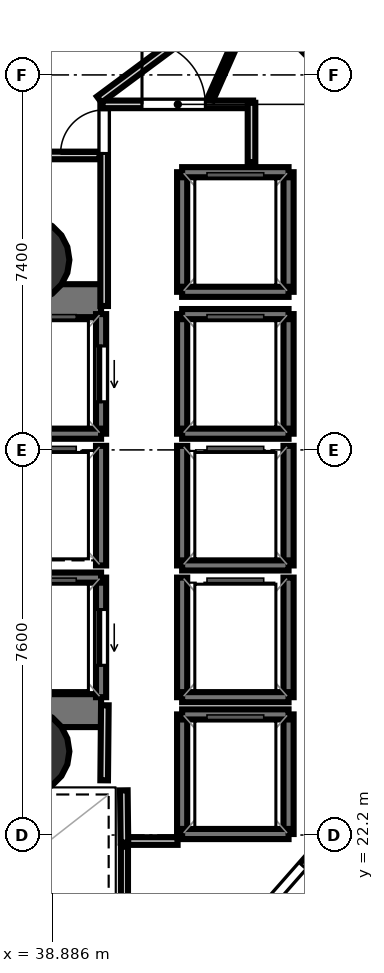
"""IFC4 building model, lengths in metres.
Left out: names, types, materials, properties, quantities, classifications, styles, units other than length and angle.
Written with IfcOpenShell. Run it as: python <this file> out.ifc"""

import sys

from ifc_helpers import new_model, si_unit, direction, frame, frame_2d, origin, origin_2d, place, context, subcontext, project, spatial, rectangle, hollow_circle, extrude, element, fill, save


model = new_model("IFC4")
c1 = context("Model", 3, precision=1e-05, world=origin(), true_north=direction((0.0, 1.0)))
c2 = subcontext(c1, "Body", "Model", "MODEL_VIEW")
j1 = project(units=[si_unit("LENGTHUNIT", "METRE"), si_unit("PLANEANGLEUNIT", "RADIAN")], contexts=[c1])
p1 = place(None, origin())
s1 = spatial("IfcSite", under=j1, at=p1, CompositionType="ELEMENT")
p2 = place(p1, origin())
s2 = spatial("IfcBuilding", under=s1, at=p2, CompositionType="ELEMENT")
p3 = place(p2, frame((0.0, 0.0, 56.2)))
s3 = spatial("IfcBuildingStorey", under=s2, at=p3, CompositionType="ELEMENT", Elevation=56.2)
p4 = place(p3, frame((29.13, 32.745, 0.0), z_axis=(0.0, 0.0, 1.0), x_axis=(1.0, 0.0, 0.0)))
e1 = element("IfcWall", 1, at=p4, inside=s3, PredefinedType="SHEAR", context=c2, shape_type="SweptSolid", body=[
    extrude(rectangle(XDim=10.72, YDim=0.65, at=frame_2d((5.36, 0.0))), origin(), (0.0, 0.0, 1.0), 3.52),
])
p5 = place(p4, frame((1.095, 0.0, 0.0)))
e2 = element("IfcOpeningElement", 2, at=p5, cuts=e1, PredefinedType="OPENING", context=c2, shape_type="SweptSolid", body=[
    extrude(rectangle(XDim=1.25, YDim=2.15, at=frame_2d((0.625, 1.075))), frame((0.0, 0.335, 0.0), z_axis=(0.0, -1.0, 0.0), x_axis=(1.0, 0.0, 0.0)), (0.0, 0.0, 1.0), 0.67),
])
p6 = place(p3, frame((29.13, 24.655, 0.0), z_axis=(0.0, 0.0, 1.0), x_axis=(1.0, 0.0, 0.0)))
e3 = element("IfcWall", 3, at=p6, inside=s3, PredefinedType="SHEAR", context=c2, shape_type="SweptSolid", body=[
    extrude(rectangle(XDim=10.72, YDim=0.65, at=frame_2d((5.36, 0.0))), origin(), (0.0, 0.0, 1.0), 3.52),
])
p7 = place(p6, frame((0.895, 0.0, 0.0)))
e4 = element("IfcOpeningElement", 4, at=p7, cuts=e3, PredefinedType="OPENING", context=c2, shape_type="SweptSolid", body=[
    extrude(rectangle(XDim=1.25, YDim=2.15, at=frame_2d((0.625, 1.075))), frame((0.0, 0.335, 0.0), z_axis=(0.0, -1.0, 0.0), x_axis=(1.0, 0.0, 0.0)), (0.0, 0.0, 1.0), 0.67),
])
for number, where, z_axis, x_axis in (
    (5, (38.4, 33.55, 0.0), (0.0, 0.0, 1.0), (1.0, 0.0, 0.0)),
    (6, (38.4, 23.85, 0.0), (0.0, 0.0, 1.0), (1.0, 0.0, 0.0)),
):
    element("IfcColumn", number, at=place(p3, frame(where, z_axis=z_axis, x_axis=x_axis)), inside=s3, PredefinedType="COLUMN", context=c2, shape_type="SweptSolid", body=[
        extrude(hollow_circle(Radius=0.825, WallThickness=0.04, at=origin_2d()), origin(), (0.0, 0.0, 1.0), 3.7),
    ])
p8 = place(p3, frame((39.85, 30.12, 0.0), z_axis=(0.0, 0.0, 1.0), x_axis=(0.0, 1.0, 0.0)))
e7 = element("IfcWall", 7, at=p8, inside=s3, PredefinedType="SOLIDWALL", context=c2, shape_type="SweptSolid", body=[
    extrude(rectangle(XDim=2.36, YDim=0.2, at=frame_2d((1.18, 0.0))), origin(), (0.0, 0.0, 1.0), 3.52),
])
p9 = place(p8, frame((0.63, 0.0, 0.0)))
e8 = element("IfcOpeningElement", 8, at=p9, cuts=e7, PredefinedType="OPENING", context=c2, shape_type="SweptSolid", body=[
    extrude(rectangle(XDim=1.1, YDim=2.15, at=frame_2d((0.55, 1.075))), frame((0.0, 0.11, 0.0), z_axis=(0.0, -1.0, 0.0), x_axis=(1.0, 0.0, 0.0)), (0.0, 0.0, 1.0), 0.22),
])
p10 = place(p3, frame((37.75, 30.12, 0.0), z_axis=(0.0, 0.0, 1.0), x_axis=(1.0, 0.0, 0.0)))
e9 = element("IfcWall", 9, at=p10, inside=s3, PredefinedType="SOLIDWALL", context=c2, shape_type="SweptSolid", body=[
    extrude(rectangle(XDim=2.1, YDim=0.2, at=frame_2d((1.05, 0.0))), origin(), (0.0, 0.0, 1.0), 3.52),
])
p11 = place(p3, frame((39.85, 24.92, 0.0), z_axis=(0.0, 0.0, 1.0), x_axis=(0.0, 1.0, 0.0)))
e10 = element("IfcWall", 10, at=p11, inside=s3, PredefinedType="SOLIDWALL", context=c2, shape_type="SweptSolid", body=[
    extrude(rectangle(XDim=2.36, YDim=0.2, at=frame_2d((1.18, 0.0))), origin(), (0.0, 0.0, 1.0), 3.52),
])
p12 = place(p11, frame((0.63, 0.0, 0.0)))
e11 = element("IfcOpeningElement", 11, at=p12, cuts=e10, PredefinedType="OPENING", context=c2, shape_type="SweptSolid", body=[
    extrude(rectangle(XDim=1.1, YDim=2.15, at=frame_2d((0.55, 1.075))), frame((0.0, 0.11, 0.0), z_axis=(0.0, -1.0, 0.0), x_axis=(1.0, 0.0, 0.0)), (0.0, 0.0, 1.0), 0.22),
])
p13 = place(p3, frame((37.75, 27.28, 0.0), z_axis=(0.0, 0.0, 1.0), x_axis=(1.0, 0.0, 0.0)))
e12 = element("IfcWall", 12, at=p13, inside=s3, PredefinedType="SOLIDWALL", context=c2, shape_type="SweptSolid", body=[
    extrude(rectangle(XDim=2.1, YDim=0.2, at=frame_2d((1.05, 0.0))), origin(), (0.0, 0.0, 1.0), 3.52),
])
for number, where, z_axis, x_axis in (
    (13, (43.55, 30.12, 0.0), (0.0, 0.0, 1.0), (0.0, 1.0, 0.0)),
    (14, (41.45, 30.12, 0.0), (0.0, 0.0, 1.0), (0.0, 1.0, 0.0)),
):
    element("IfcWall", number, at=place(p3, frame(where, z_axis=z_axis, x_axis=x_axis)), inside=s3, PredefinedType="SOLIDWALL", context=c2, shape_type="SweptSolid", body=[
        extrude(rectangle(XDim=2.36, YDim=0.2, at=frame_2d((1.18, 0.0))), origin(), (0.0, 0.0, 1.0), 3.52),
    ])
for number, where, z_axis, x_axis in (
    (15, (41.45, 32.48, 0.0), (0.0, 0.0, 1.0), (1.0, 0.0, 0.0)),
    (16, (41.45, 30.12, 0.0), (0.0, 0.0, 1.0), (1.0, 0.0, 0.0)),
):
    element("IfcWall", number, at=place(p3, frame(where, z_axis=z_axis, x_axis=x_axis)), inside=s3, PredefinedType="SOLIDWALL", context=c2, shape_type="SweptSolid", body=[
        extrude(rectangle(XDim=2.1, YDim=0.2, at=frame_2d((1.05, 0.0))), origin(), (0.0, 0.0, 1.0), 3.52),
    ])
for number, where, z_axis, x_axis in (
    (17, (43.55, 27.52, 0.0), (0.0, 0.0, 1.0), (0.0, 1.0, 0.0)),
    (18, (41.45, 27.52, 0.0), (0.0, 0.0, 1.0), (0.0, 1.0, 0.0)),
):
    element("IfcWall", number, at=place(p3, frame(where, z_axis=z_axis, x_axis=x_axis)), inside=s3, PredefinedType="SOLIDWALL", context=c2, shape_type="SweptSolid", body=[
        extrude(rectangle(XDim=2.36, YDim=0.2, at=frame_2d((1.18, 0.0))), origin(), (0.0, 0.0, 1.0), 3.52),
    ])
p14 = place(p3, frame((41.45, 27.52, 0.0), z_axis=(0.0, 0.0, 1.0), x_axis=(1.0, 0.0, 0.0)))
e19 = element("IfcWall", 19, at=p14, inside=s3, PredefinedType="SOLIDWALL", context=c2, shape_type="SweptSolid", body=[
    extrude(rectangle(XDim=2.1, YDim=0.2, at=frame_2d((1.05, 0.0))), origin(), (0.0, 0.0, 1.0), 3.52),
])
for number, where, z_axis, x_axis in (
    (20, (43.55, 24.92, 0.0), (0.0, 0.0, 1.0), (0.0, 1.0, 0.0)),
    (21, (41.45, 24.92, 0.0), (0.0, 0.0, 1.0), (0.0, 1.0, 0.0)),
):
    element("IfcWall", number, at=place(p3, frame(where, z_axis=z_axis, x_axis=x_axis)), inside=s3, PredefinedType="SOLIDWALL", context=c2, shape_type="SweptSolid", body=[
        extrude(rectangle(XDim=2.36, YDim=0.2, at=frame_2d((1.18, 0.0))), origin(), (0.0, 0.0, 1.0), 3.52),
    ])
p15 = place(p3, frame((41.45, 24.92, 0.0), z_axis=(0.0, 0.0, 1.0), x_axis=(1.0, 0.0, 0.0)))
e22 = element("IfcWall", 22, at=p15, inside=s3, PredefinedType="SOLIDWALL", context=c2, shape_type="SweptSolid", body=[
    extrude(rectangle(XDim=2.1, YDim=0.2, at=frame_2d((1.05, 0.0))), origin(), (0.0, 0.0, 1.0), 3.52),
])
p16 = place(p3, frame((39.85, 27.52, 0.0), z_axis=(0.0, 0.0, 1.0), x_axis=(0.0, 1.0, 0.0)))
e23 = element("IfcWall", 23, at=p16, inside=s3, PredefinedType="SOLIDWALL", context=c2, shape_type="SweptSolid", body=[
    extrude(rectangle(XDim=2.36, YDim=0.2, at=frame_2d((1.18, 0.0))), origin(), (0.0, 0.0, 1.0), 3.52),
])
for number, where, z_axis, x_axis in (
    (24, (43.55, 22.22, 0.0), (0.0, 0.0, 1.0), (0.0, 1.0, 0.0)),
    (25, (41.45, 22.22, 0.0), (0.0, 0.0, 1.0), (0.0, 1.0, 0.0)),
):
    element("IfcWall", number, at=place(p3, frame(where, z_axis=z_axis, x_axis=x_axis)), inside=s3, PredefinedType="SOLIDWALL", context=c2, shape_type="SweptSolid", body=[
        extrude(rectangle(XDim=2.36, YDim=0.2, at=frame_2d((1.18, 0.0))), origin(), (0.0, 0.0, 1.0), 3.52),
    ])
for number, where, z_axis, x_axis in (
    (26, (41.45, 24.58, 0.0), (0.0, 0.0, 1.0), (1.0, 0.0, 0.0)),
    (27, (41.45, 22.22, 0.0), (0.0, 0.0, 1.0), (1.0, 0.0, 0.0)),
):
    element("IfcWall", number, at=place(p3, frame(where, z_axis=z_axis, x_axis=x_axis)), inside=s3, PredefinedType="SOLIDWALL", context=c2, shape_type="SweptSolid", body=[
        extrude(rectangle(XDim=2.1, YDim=0.2, at=frame_2d((1.05, 0.0))), origin(), (0.0, 0.0, 1.0), 3.52),
    ])
for number, where, z_axis, x_axis in (
    (28, (43.55, 32.92, 0.0), (0.0, 0.0, 1.0), (0.0, 1.0, 0.0)),
    (29, (41.45, 32.92, 0.0), (0.0, 0.0, 1.0), (0.0, 1.0, 0.0)),
):
    element("IfcWall", number, at=place(p3, frame(where, z_axis=z_axis, x_axis=x_axis)), inside=s3, PredefinedType="SOLIDWALL", context=c2, shape_type="SweptSolid", body=[
        extrude(rectangle(XDim=2.36, YDim=0.2, at=frame_2d((1.18, 0.0))), origin(), (0.0, 0.0, 1.0), 3.52),
    ])
for number, where, z_axis, x_axis in (
    (30, (41.45, 35.28, 0.0), (0.0, 0.0, 1.0), (1.0, 0.0, 0.0)),
    (31, (41.45, 32.92, 0.0), (0.0, 0.0, 1.0), (1.0, 0.0, 0.0)),
):
    element("IfcWall", number, at=place(p3, frame(where, z_axis=z_axis, x_axis=x_axis)), inside=s3, PredefinedType="SOLIDWALL", context=c2, shape_type="SweptSolid", body=[
        extrude(rectangle(XDim=2.1, YDim=0.2, at=frame_2d((1.05, 0.0))), origin(), (0.0, 0.0, 1.0), 3.52),
    ])
p17 = place(p3, frame((39.911, 32.64, 0.0), z_axis=(0.0, 0.0, 1.0), x_axis=(0.0, 1.0, 0.0)))
e32 = element("IfcWall", 32, at=p17, inside=s3, PredefinedType="PARTITIONING", context=c2, shape_type="SweptSolid", body=[
    extrude(rectangle(XDim=4.01, YDim=0.15, at=frame_2d((2.005, 0.0))), origin(), (0.0, 0.0, 1.0), 2.84),
])
p18 = place(p17, frame((3.01, 0.0, 0.0)))
e33 = element("IfcOpeningElement", 33, at=p18, cuts=e32, PredefinedType="OPENING", context=c2, shape_type="SweptSolid", body=[
    extrude(rectangle(XDim=0.86, YDim=2.05, at=frame_2d((0.43, 1.025))), frame((0.0, 0.085, 0.0), z_axis=(0.0, -1.0, 0.0), x_axis=(1.0, 0.0, 0.0)), (0.0, 0.0, 1.0), 0.17),
])
p19 = place(p3, frame((39.88, 36.619, 0.0), z_axis=(0.0, 0.0, 1.0), x_axis=(1.0, 0.0, 0.0)))
e34 = element("IfcWall", 34, at=p19, inside=s3, PredefinedType="PARTITIONING", context=c2, shape_type="SweptSolid", body=[
    extrude(rectangle(XDim=2.97, YDim=0.15, at=frame_2d((1.485, 0.0))), origin(), (0.0, 0.0, 1.0), 2.798),
])
p20 = place(p19, frame((0.778, 0.0, 0.0)))
e35 = element("IfcOpeningElement", 35, at=p20, cuts=e34, PredefinedType="OPENING", context=c2, shape_type="SweptSolid", body=[
    extrude(rectangle(XDim=1.25, YDim=2.2, at=frame_2d((0.625, 1.1))), frame((0.0, 0.085, 0.0), z_axis=(0.0, -1.0, 0.0), x_axis=(1.0, 0.0, 0.0)), (0.0, 0.0, 1.0), 0.17),
])
p21 = place(p3, frame((42.819, 36.65, 0.0), z_axis=(0.0, 0.0, 1.0), x_axis=(0.0, -1.0, 0.0)))
e36 = element("IfcWall", 36, at=p21, inside=s3, PredefinedType="PARTITIONING", context=c2, shape_type="SweptSolid", body=[
    extrude(rectangle(XDim=1.17, YDim=0.15, at=frame_2d((0.585, 0.0))), origin(), (0.0, 0.0, 1.0), 2.798),
])
p22 = place(p3, frame((41.36, 22.081, 0.0), z_axis=(0.0, 0.0, 1.0), x_axis=(-1.0, 0.0, 0.0)))
e37 = element("IfcWall", 37, at=p22, inside=s3, PredefinedType="PARTITIONING", context=c2, shape_type="SweptSolid", body=[
    extrude(rectangle(XDim=1.08, YDim=0.15, at=frame_2d((0.54, 0.0))), origin(), (0.0, 0.0, 1.0), 2.84),
])
p23 = place(p3, frame((40.311, 22.05, 0.0), z_axis=(0.0, 0.0, 1.0), x_axis=(-0.011836292006, 0.999929948642, 0.0)))
e38 = element("IfcWall", 38, at=p23, inside=s3, PredefinedType="PARTITIONING", context=c2, shape_type="SweptSolid", body=[
    extrude(rectangle(XDim=1.031, YDim=0.15, at=frame_2d((0.516, 0.0))), origin(), (0.0, 0.0, 1.0), 2.84),
])
p24 = place(p3, frame((39.911, 23.28, 0.0), z_axis=(0.0, 0.0, 1.0), x_axis=(0.009397771291, 0.999955839972, 0.0)))
e39 = element("IfcWall", 39, at=p24, inside=s3, PredefinedType="PARTITIONING", context=c2, shape_type="SweptSolid", body=[
    extrude(rectangle(XDim=1.481, YDim=0.15, at=frame_2d((0.74, 0.0))), origin(), (0.0, 0.0, 1.0), 2.84),
])
p25 = place(p3, frame((42.185, 38.475, 0.0), z_axis=(0.0, 0.0, 1.0), x_axis=(-0.802818467394, -0.596223538961, 0.0)))
e40 = element("IfcWall", 40, at=p25, inside=s3, PredefinedType="PARTITIONING", context=c2, shape_type="SweptSolid", body=[
    extrude(rectangle(XDim=2.953, YDim=0.15, at=frame_2d((1.477, 0.0))), origin(), (0.0, 0.0, 1.0), 2.798),
])
p26 = place(p3, frame((39.818, 35.611, 0.0), z_axis=(0.0, 0.0, 1.0), x_axis=(-1.0, 0.0, 0.0)))
e41 = element("IfcWall", 41, at=p26, inside=s3, PredefinedType="PARTITIONING", context=c2, shape_type="SweptSolid", body=[
    extrude(rectangle(XDim=2.768, YDim=0.15, at=frame_2d((1.384, 0.0))), origin(), (0.0, 0.0, 1.0), 2.84),
])
p27 = place(p3, frame((40.311, 18.0, 0.0), z_axis=(0.0, 0.0, 1.0), x_axis=(0.0, 1.0, 0.0)))
e42 = element("IfcWall", 42, at=p27, inside=s3, PredefinedType="PARTITIONING", context=c2, shape_type="SweptSolid", body=[
    extrude(rectangle(XDim=3.97, YDim=0.14, at=frame_2d((1.985, 0.0))), origin(), (0.0, 0.0, 1.0), 2.84),
])
p28 = place(p3, frame((42.005, 36.717, 0.0), z_axis=(0.0, 0.0, 1.0), x_axis=(0.405063455742, 0.914288574151, 0.0)))
e43 = element("IfcWall", 43, at=p28, inside=s3, PredefinedType="PARTITIONING", context=c2, shape_type="SweptSolid", body=[
    extrude(rectangle(XDim=2.803, YDim=0.12, at=frame_2d((1.402, 0.0))), origin(), (0.0, 0.0, 1.0), 2.798),
])
p29 = place(p3, frame((42.849, 38.728, 0.0), z_axis=(0.0, 0.0, 1.0), x_axis=(0.699253855462, -0.714873447276, 0.0)))
e44 = element("IfcWall", 44, at=p29, inside=s3, PredefinedType="PARTITIONING", context=c2, shape_type="SweptSolid", body=[
    extrude(rectangle(XDim=12.114, YDim=0.105, at=frame_2d((6.057, 0.0))), origin(), (0.0, 0.0, 1.0), 2.798),
])
p30 = place(p3, frame((51.319, 30.11, 0.0), z_axis=(0.0, 0.0, 1.0), x_axis=(-0.660511140623, -0.750816244572, 0.0)))
e45 = element("IfcWall", 45, at=p30, inside=s3, PredefinedType="PARTITIONING", context=c2, shape_type="SweptSolid", body=[
    extrude(rectangle(XDim=22.534, YDim=0.14, at=frame_2d((11.267, 0.0))), origin(), (0.0, 0.0, 1.0), 2.798),
])
p31 = place(p30, frame((11.342, 0.0, 0.0)))
e46 = element("IfcOpeningElement", 46, at=p31, cuts=e45, PredefinedType="OPENING", context=c2, shape_type="SweptSolid", body=[
    extrude(rectangle(XDim=1.25, YDim=2.2, at=frame_2d((0.625, 1.1))), frame((0.0, 0.08, 0.0), z_axis=(0.0, -1.0, 0.0), x_axis=(1.0, 0.0, 0.0)), (0.0, 0.0, 1.0), 0.16),
])
p32 = place(p9, origin())
e47 = element("IfcDoor", 47, at=p32, inside=s3, OperationType="SLIDING_TO_LEFT", PredefinedType="DOOR", context=c2, shape_type="SweptSolid", body=[
    extrude(rectangle(XDim=1.1, YDim=2.15, at=frame_2d((0.55, 1.075))), frame((0.0, 0.025, 0.0), z_axis=(0.0, -1.0, 0.0), x_axis=(1.0, 0.0, 0.0)), (0.0, 0.0, 1.0), 0.05),
])
fill(e8, e47)
p33 = place(p12, origin())
e48 = element("IfcDoor", 48, at=p33, inside=s3, OperationType="SLIDING_TO_LEFT", PredefinedType="DOOR", context=c2, shape_type="SweptSolid", body=[
    extrude(rectangle(XDim=1.1, YDim=2.15, at=frame_2d((0.55, 1.075))), frame((0.0, 0.025, 0.0), z_axis=(0.0, -1.0, 0.0), x_axis=(1.0, 0.0, 0.0)), (0.0, 0.0, 1.0), 0.05),
])
fill(e11, e48)
p34 = place(p18, origin())
e49 = element("IfcDoor", 49, at=p34, inside=s3, OperationType="SINGLE_SWING_LEFT", PredefinedType="DOOR", context=c2, shape_type="SweptSolid", body=[
    extrude(rectangle(XDim=0.86, YDim=2.05, at=frame_2d((0.43, 1.025))), frame((0.0, 0.025, 0.0), z_axis=(0.0, -1.0, 0.0), x_axis=(1.0, 0.0, 0.0)), (0.0, 0.0, 1.0), 0.05),
])
fill(e33, e49)
p35 = place(p20, origin())
e50 = element("IfcDoor", 50, at=p35, inside=s3, OperationType="SINGLE_SWING_LEFT", PredefinedType="DOOR", context=c2, shape_type="SweptSolid", body=[
    extrude(rectangle(XDim=1.25, YDim=2.2, at=frame_2d((0.625, 1.1))), frame((0.0, 0.025, 0.0), z_axis=(0.0, -1.0, 0.0), x_axis=(1.0, 0.0, 0.0)), (0.0, 0.0, 1.0), 0.05),
])
fill(e35, e50)
p36 = place(p31, origin())
e51 = element("IfcDoor", 51, at=p36, inside=s3, OperationType="SINGLE_SWING_RIGHT", PredefinedType="DOOR", context=c2, shape_type="SweptSolid", body=[
    extrude(rectangle(XDim=1.25, YDim=2.2, at=frame_2d((0.625, 1.1))), frame((0.0, 0.025, 0.0), z_axis=(0.0, -1.0, 0.0), x_axis=(1.0, 0.0, 0.0)), (0.0, 0.0, 1.0), 0.05),
])
fill(e46, e51)
save(model, sys.argv[1])
